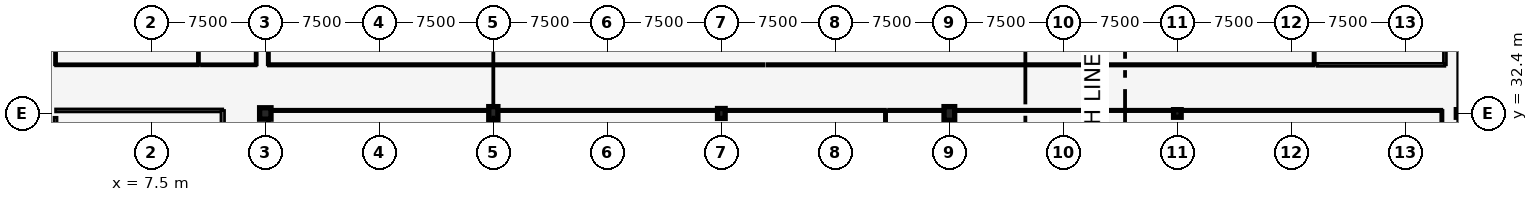
"""IFC4 building model, lengths in metres.
Left out: names, types, materials, properties, quantities, classifications, styles, units other than length and angle.
Written with IfcOpenShell. Run it as: python <this file> out.ifc"""

import sys

from ifc_helpers import new_model, si_unit, direction, frame, frame_2d, origin, origin_2d, place, context, subcontext, project, spatial, rectangle, circle, extrude, element, fill, save


model = new_model("IFC4")
c1 = context("Model", 3, precision=1e-05, world=origin(), true_north=direction((0.0, 1.0)))
c2 = subcontext(c1, "Body", "Model", "MODEL_VIEW")
j1 = project(units=[si_unit("LENGTHUNIT", "METRE"), si_unit("PLANEANGLEUNIT", "RADIAN")], contexts=[c1])
p1 = place(None, origin())
s1 = spatial("IfcSite", under=j1, at=p1, CompositionType="ELEMENT")
p2 = place(p1, origin())
s2 = spatial("IfcBuilding", under=s1, at=p2, CompositionType="ELEMENT")
p3 = place(p2, origin())
s3 = spatial("IfcBuildingStorey", under=s2, at=p3, CompositionType="ELEMENT", Elevation=0.0)
p4 = place(p3, frame((15.0, 32.4, 0.0), z_axis=(0.0, 0.0, 1.0), x_axis=(1.0, 0.0, 0.0)))
e1 = element("IfcColumn", 1, at=p4, inside=s3, PredefinedType="COLUMN", context=c2, shape_type="SweptSolid", body=[
    extrude(rectangle(XDim=0.75, YDim=0.75, at=origin_2d()), origin(), (0.0, 0.0, 1.0), 4.8),
])
p5 = place(p3, frame((30.0, 32.4, 0.0), z_axis=(0.0, 0.0, 1.0), x_axis=(1.0, 0.0, 0.0)))
e2 = element("IfcColumn", 2, at=p5, inside=s3, PredefinedType="COLUMN", context=c2, shape_type="SweptSolid", body=[
    extrude(rectangle(XDim=0.6, YDim=0.9, at=origin_2d()), origin(), (0.0, 0.0, 1.0), 4.8),
])
p6 = place(p3, frame((45.0, 32.4, 0.0), z_axis=(0.0, 0.0, 1.0), x_axis=(1.0, 0.0, 0.0)))
e3 = element("IfcColumn", 3, at=p6, inside=s3, PredefinedType="COLUMN", context=c2, shape_type="SweptSolid", body=[
    extrude(rectangle(XDim=0.5, YDim=0.65, at=origin_2d()), origin(), (0.0, 0.0, 1.0), 4.8),
])
p7 = place(p3, frame((60.0, 32.4, 0.0), z_axis=(0.0, 0.0, 1.0), x_axis=(1.0, 0.0, 0.0)))
e4 = element("IfcColumn", 4, at=p7, inside=s3, PredefinedType="COLUMN", context=c2, shape_type="SweptSolid", body=[
    extrude(rectangle(XDim=0.7, YDim=0.9, at=origin_2d()), origin(), (0.0, 0.0, 1.0), 4.8),
])
p8 = place(p3, frame((75.0, 32.4, 0.0), z_axis=(0.0, 0.0, 1.0), x_axis=(1.0, 0.0, 0.0)))
e5 = element("IfcColumn", 5, at=p8, inside=s3, PredefinedType="COLUMN", context=c2, shape_type="SweptSolid", body=[
    extrude(circle(Radius=0.25, at=origin_2d()), origin(), (0.0, 0.0, 1.0), 4.8),
])
p9 = place(p3, frame((93.6, 32.4, 0.0), z_axis=(0.0, 0.0, 1.0), x_axis=(1.0, 0.0, 0.0)))
e6 = element("IfcColumn", 6, at=p9, inside=s3, PredefinedType="COLUMN", context=c2, shape_type="SweptSolid", body=[
    extrude(rectangle(XDim=0.5, YDim=0.5, at=origin_2d()), origin(), (0.0, 0.0, 1.0), 4.8),
])
p10 = place(p3, frame((93.6, 10.8, 0.0), z_axis=(0.0, 0.0, 1.0), x_axis=(0.0, 1.0, 0.0)))
e7 = element("IfcWall", 7, at=p10, inside=s3, PredefinedType="SOLIDWALL", context=c2, shape_type="SweptSolid", body=[
    extrude(rectangle(XDim=43.2, YDim=0.32, at=frame_2d((21.6, 0.0))), origin(), (0.0, 0.0, 1.0), 4.25),
])
p11 = place(p10, frame((6.5, 0.0, 0.0)))
e8 = element("IfcOpeningElement", 8, at=p11, cuts=e7, PredefinedType="OPENING", context=c2, shape_type="SweptSolid", body=[
    extrude(rectangle(XDim=4.4, YDim=3.55, at=frame_2d((2.2, 1.775))), frame((0.0, 0.17, 0.0), z_axis=(0.0, -1.0, 0.0), x_axis=(1.0, 0.0, 0.0)), (0.0, 0.0, 1.0), 0.34),
])
p12 = place(p10, frame((25.5, 0.0, 0.0)))
e9 = element("IfcOpeningElement", 9, at=p12, cuts=e7, PredefinedType="OPENING", context=c2, shape_type="SweptSolid", body=[
    extrude(rectangle(XDim=4.4, YDim=3.55, at=frame_2d((2.2, 1.775))), frame((0.0, 0.17, 0.0), z_axis=(0.0, -1.0, 0.0), x_axis=(1.0, 0.0, 0.0)), (0.0, 0.0, 1.0), 0.34),
])
p13 = place(p3, frame((55.8, 20.05, 0.0), z_axis=(0.0, 0.0, 1.0), x_axis=(0.0, 1.0, 0.0)))
e10 = element("IfcWall", 10, at=p13, inside=s3, PredefinedType="PARTITIONING", context=c2, shape_type="SweptSolid", body=[
    extrude(rectangle(XDim=12.55, YDim=0.15, at=frame_2d((6.275, 0.0))), origin(), (0.0, 0.0, 1.0), 3.87),
])
p14 = place(p3, frame((15.2, 32.6, 0.0), z_axis=(0.0, 0.0, 1.0), x_axis=(0.0, -1.0, 0.0)))
e11 = element("IfcWall", 11, at=p14, inside=s3, PredefinedType="PARTITIONING", context=c2, shape_type="SweptSolid", body=[
    extrude(rectangle(XDim=12.55, YDim=0.15, at=frame_2d((6.275, 0.0))), origin(), (0.0, 0.0, 1.0), 4.1),
])
p15 = place(p3, frame((15.2, 32.6, 0.0), z_axis=(0.0, 0.0, 1.0), x_axis=(1.0, 0.0, 0.0)))
e12 = element("IfcWall", 12, at=p15, inside=s3, PredefinedType="PARTITIONING", context=c2, shape_type="SweptSolid", body=[
    extrude(rectangle(XDim=40.6, YDim=0.16, at=frame_2d((20.3, 0.0))), origin(), (0.0, 0.0, 1.0), 3.87),
])
p16 = place(p15, frame((19.3, 0.0, 0.0)))
e13 = element("IfcOpeningElement", 13, at=p16, cuts=e12, PredefinedType="OPENING", context=c2, shape_type="SweptSolid", body=[
    extrude(rectangle(XDim=2.0, YDim=2.3, at=frame_2d((1.0, 1.15))), frame((0.0, 0.09, 0.0), z_axis=(0.0, -1.0, 0.0), x_axis=(1.0, 0.0, 0.0)), (0.0, 0.0, 1.0), 0.18),
])
p17 = place(p15, frame((35.4, 0.0, 0.0)))
e14 = element("IfcOpeningElement", 14, at=p17, cuts=e12, PredefinedType="OPENING", context=c2, shape_type="SweptSolid", body=[
    extrude(rectangle(XDim=2.0, YDim=2.3, at=frame_2d((1.0, 1.15))), frame((0.0, 0.09, 0.0), z_axis=(0.0, -1.0, 0.0), x_axis=(1.0, 0.0, 0.0)), (0.0, 0.0, 1.0), 0.18),
])
p18 = place(p3, frame((92.4, 20.05, 0.0), z_axis=(0.0, 0.0, 1.0), x_axis=(0.0, 1.0, 0.0)))
e15 = element("IfcWall", 15, at=p18, inside=s3, PredefinedType="PARTITIONING", context=c2, shape_type="SweptSolid", body=[
    extrude(rectangle(XDim=12.55, YDim=0.15, at=frame_2d((6.275, 0.0))), origin(), (0.0, 0.0, 1.0), 3.782),
])
p19 = place(p3, frame((56.0, 32.6, 0.0), z_axis=(0.0, 0.0, 1.0), x_axis=(1.0, 0.0, 0.0)))
e16 = element("IfcWall", 16, at=p19, inside=s3, PredefinedType="PARTITIONING", context=c2, shape_type="SweptSolid", body=[
    extrude(rectangle(XDim=36.4, YDim=0.16, at=frame_2d((18.2, 0.0))), origin(), (0.0, 0.0, 1.0), 3.782),
])
p20 = place(p19, frame((10.32, 0.0, 0.0)))
e17 = element("IfcOpeningElement", 17, at=p20, cuts=e16, PredefinedType="OPENING", context=c2, shape_type="SweptSolid", body=[
    extrude(rectangle(XDim=2.0, YDim=2.3, at=frame_2d((1.0, 1.15))), frame((0.0, 0.09, 0.0), z_axis=(0.0, -1.0, 0.0), x_axis=(1.0, 0.0, 0.0)), (0.0, 0.0, 1.0), 0.18),
])
p21 = place(p19, frame((31.2, 0.0, 0.0)))
e18 = element("IfcOpeningElement", 18, at=p21, cuts=e16, PredefinedType="OPENING", context=c2, shape_type="SweptSolid", body=[
    extrude(rectangle(XDim=2.0, YDim=2.3, at=frame_2d((1.0, 1.15))), frame((0.0, 0.09, 0.0), z_axis=(0.0, -1.0, 0.0), x_axis=(1.0, 0.0, 0.0)), (0.0, 0.0, 1.0), 0.18),
])
p22 = place(p3, frame((84.0, 35.6, 0.0), z_axis=(0.0, 0.0, 1.0), x_axis=(0.0, 1.0, 0.0)))
e19 = element("IfcWall", 19, at=p22, inside=s3, PredefinedType="PARTITIONING", context=c2, shape_type="SweptSolid", body=[
    extrude(rectangle(XDim=17.15, YDim=0.15, at=frame_2d((8.575, 0.0))), origin(), (0.0, 0.0, 1.0), 4.1),
])
p23 = place(p3, frame((84.0, 35.6, 0.0), z_axis=(0.0, 0.0, 1.0), x_axis=(-1.0, 0.0, 0.0)))
e20 = element("IfcWall", 20, at=p23, inside=s3, PredefinedType="PARTITIONING", context=c2, shape_type="SweptSolid", body=[
    extrude(rectangle(XDim=36.0, YDim=0.16, at=frame_2d((18.0, 0.0))), origin(), (0.0, 0.0, 1.0), 4.025),
])
p24 = place(p23, frame((17.0, 0.0, 0.0)))
e21 = element("IfcOpeningElement", 21, at=p24, cuts=e20, PredefinedType="OPENING", context=c2, shape_type="SweptSolid", body=[
    extrude(rectangle(XDim=2.0, YDim=2.3, at=frame_2d((1.0, 1.15))), frame((0.0, 0.09, 0.0), z_axis=(0.0, -1.0, 0.0), x_axis=(1.0, 0.0, 0.0)), (0.0, 0.0, 1.0), 0.18),
])
p25 = place(p23, frame((30.8, 0.0, 0.0)))
e22 = element("IfcOpeningElement", 22, at=p25, cuts=e20, PredefinedType="OPENING", context=c2, shape_type="SweptSolid", body=[
    extrude(rectangle(XDim=2.0, YDim=2.3, at=frame_2d((1.0, 1.15))), frame((0.0, 0.09, 0.0), z_axis=(0.0, -1.0, 0.0), x_axis=(1.0, 0.0, 0.0)), (0.0, 0.0, 1.0), 0.18),
])
p26 = place(p3, frame((15.2, 52.75, 0.0), z_axis=(0.0, 0.0, 1.0), x_axis=(0.0, -1.0, 0.0)))
e23 = element("IfcWall", 23, at=p26, inside=s3, PredefinedType="PARTITIONING", context=c2, shape_type="SweptSolid", body=[
    extrude(rectangle(XDim=17.15, YDim=0.15, at=frame_2d((8.575, 0.0))), origin(), (0.0, 0.0, 1.0), 4.025),
])
p27 = place(p3, frame((47.8, 35.6, 0.0), z_axis=(0.0, 0.0, 1.0), x_axis=(-1.0, 0.0, 0.0)))
e24 = element("IfcWall", 24, at=p27, inside=s3, PredefinedType="PARTITIONING", context=c2, shape_type="SweptSolid", body=[
    extrude(rectangle(XDim=32.6, YDim=0.16, at=frame_2d((16.3, 0.0))), origin(), (0.0, 0.0, 1.0), 4.025),
])
p28 = place(p27, frame((15.3, 0.0, 0.0)))
e25 = element("IfcOpeningElement", 25, at=p28, cuts=e24, PredefinedType="OPENING", context=c2, shape_type="SweptSolid", body=[
    extrude(rectangle(XDim=2.0, YDim=2.3, at=frame_2d((1.0, 1.15))), frame((0.0, 0.09, 0.0), z_axis=(0.0, -1.0, 0.0), x_axis=(1.0, 0.0, 0.0)), (0.0, 0.0, 1.0), 0.18),
])
p29 = place(p27, frame((27.4, 0.0, 0.0)))
e26 = element("IfcOpeningElement", 26, at=p29, cuts=e24, PredefinedType="OPENING", context=c2, shape_type="SweptSolid", body=[
    extrude(rectangle(XDim=2.0, YDim=2.3, at=frame_2d((1.0, 1.15))), frame((0.0, 0.09, 0.0), z_axis=(0.0, -1.0, 0.0), x_axis=(1.0, 0.0, 0.0)), (0.0, 0.0, 1.0), 0.18),
])
p30 = place(p3, frame((1.2, 32.6, 0.0), z_axis=(0.0, 0.0, 1.0), x_axis=(1.0, 0.0, 0.0)))
e27 = element("IfcWall", 27, at=p30, inside=s3, PredefinedType="SOLIDWALL", context=c2, shape_type="SweptSolid", body=[
    extrude(rectangle(XDim=11.0, YDim=0.2, at=frame_2d((5.5, 0.0))), origin(), (0.0, 0.0, 1.0), 3.87),
])
p31 = place(p3, frame((1.2, 32.15, 0.0), z_axis=(0.0, 0.0, 1.0), x_axis=(0.0, -1.0, 0.0)))
e28 = element("IfcWall", 28, at=p31, inside=s3, PredefinedType="SOLIDWALL", context=c2, shape_type="SweptSolid", body=[
    extrude(rectangle(XDim=9.7, YDim=0.2, at=frame_2d((4.85, 0.0))), origin(), (0.0, 0.0, 1.0), 4.1),
])
p32 = place(p3, frame((12.2, 22.2, 0.0), z_axis=(0.0, 0.0, 1.0), x_axis=(0.0, 1.0, 0.0)))
e29 = element("IfcWall", 29, at=p32, inside=s3, PredefinedType="SOLIDWALL", context=c2, shape_type="SweptSolid", body=[
    extrude(rectangle(XDim=10.4, YDim=0.24, at=frame_2d((5.2, 0.0))), origin(), (0.0, 0.0, 1.0), 3.87),
])
p33 = place(p32, frame((4.4, 0.0, 0.0)))
e30 = element("IfcOpeningElement", 30, at=p33, cuts=e29, PredefinedType="OPENING", context=c2, shape_type="SweptSolid", body=[
    extrude(rectangle(XDim=1.6, YDim=2.15, at=frame_2d((0.8, 1.075))), frame((0.0, 0.13, 0.0), z_axis=(0.0, -1.0, 0.0), x_axis=(1.0, 0.0, 0.0)), (0.0, 0.0, 1.0), 0.26),
])
p34 = place(p3, frame((92.6, 35.6, 0.0), z_axis=(0.0, 0.0, 1.0), x_axis=(0.0, 1.0, 0.0)))
e31 = element("IfcWall", 31, at=p34, inside=s3, PredefinedType="SOLIDWALL", context=c2, shape_type="SweptSolid", body=[
    extrude(rectangle(XDim=9.55, YDim=0.2, at=frame_2d((4.775, 0.0))), origin(), (0.0, 0.0, 1.0), 4.1),
])
p35 = place(p3, frame((92.6, 35.6, 0.0), z_axis=(0.0, 0.0, 1.0), x_axis=(-1.0, 0.0, 0.0)))
e32 = element("IfcWall", 32, at=p35, inside=s3, PredefinedType="SOLIDWALL", context=c2, shape_type="SweptSolid", body=[
    extrude(rectangle(XDim=8.4, YDim=0.2, at=frame_2d((4.2, 0.0))), origin(), (0.0, 0.0, 1.0), 4.1),
])
p36 = place(p35, frame((3.3, 0.0, 0.0)))
e33 = element("IfcOpeningElement", 33, at=p36, cuts=e32, PredefinedType="OPENING", context=c2, shape_type="SweptSolid", body=[
    extrude(rectangle(XDim=1.8, YDim=2.2, at=frame_2d((0.9, 1.1))), frame((0.0, 0.11, 0.0), z_axis=(0.0, -1.0, 0.0), x_axis=(1.0, 0.0, 0.0)), (0.0, 0.0, 1.0), 0.22),
])
for number, where, z_axis, x_axis in (
    (34, (10.6, 35.6, 0.0), (0.0, 0.0, 1.0), (0.0, 1.0, 0.0)),
    (35, (1.2, 42.95, 0.0), (0.0, 0.0, 1.0), (0.0, -1.0, 0.0)),
):
    element("IfcWall", number, at=place(p3, frame(where, z_axis=z_axis, x_axis=x_axis)), inside=s3, PredefinedType="PARTITIONING", context=c2, shape_type="SweptSolid", body=[
        extrude(rectangle(XDim=7.35, YDim=0.14, at=frame_2d((3.675, 0.0))), origin(), (0.0, 0.0, 1.0), 3.8),
    ])
p37 = place(p3, frame((10.6, 35.6, 0.0), z_axis=(0.0, 0.0, 1.0), x_axis=(-1.0, 0.0, 0.0)))
e36 = element("IfcWall", 36, at=p37, inside=s3, PredefinedType="PARTITIONING", context=c2, shape_type="SweptSolid", body=[
    extrude(rectangle(XDim=9.4, YDim=0.14, at=frame_2d((4.7, 0.0))), origin(), (0.0, 0.0, 1.0), 3.8),
])
p38 = place(p37, frame((4.21, 0.0, 0.0)))
e37 = element("IfcOpeningElement", 37, at=p38, cuts=e36, PredefinedType="OPENING", context=c2, shape_type="SweptSolid", body=[
    extrude(rectangle(XDim=0.98, YDim=2.15, at=frame_2d((0.49, 1.075))), frame((0.0, 0.08, 0.0), z_axis=(0.0, -1.0, 0.0), x_axis=(1.0, 0.0, 0.0)), (0.0, 0.0, 1.0), 0.16),
])
p39 = place(p3, frame((14.4, 35.6, 0.0), z_axis=(0.0, 0.0, 1.0), x_axis=(0.0, 1.0, 0.0)))
e38 = element("IfcWall", 38, at=p39, inside=s3, PredefinedType="PARTITIONING", context=c2, shape_type="SweptSolid", body=[
    extrude(rectangle(XDim=7.15, YDim=0.14, at=frame_2d((3.575, 0.0))), origin(), (0.0, 0.0, 1.0), 3.8),
])
p40 = place(p3, frame((14.4, 35.6, 0.0), z_axis=(0.0, 0.0, 1.0), x_axis=(-1.0, 0.0, 0.0)))
e39 = element("IfcWall", 39, at=p40, inside=s3, PredefinedType="PARTITIONING", context=c2, shape_type="SweptSolid", body=[
    extrude(rectangle(XDim=3.6, YDim=0.14, at=frame_2d((1.8, 0.0))), origin(), (0.0, 0.0, 1.0), 3.8),
])
p41 = place(p40, frame((1.305, 0.0, 0.0)))
e40 = element("IfcOpeningElement", 40, at=p41, cuts=e39, PredefinedType="OPENING", context=c2, shape_type="SweptSolid", body=[
    extrude(rectangle(XDim=0.99, YDim=2.15, at=frame_2d((0.495, 1.075))), frame((0.0, 0.08, 0.0), z_axis=(0.0, -1.0, 0.0), x_axis=(1.0, 0.0, 0.0)), (0.0, 0.0, 1.0), 0.16),
])
p42 = place(p16, origin())
e41 = element("IfcDoor", 41, at=p42, inside=s3, OperationType="DOUBLE_SWING_LEFT", PredefinedType="DOOR", context=c2, shape_type="SweptSolid", body=[
    extrude(rectangle(XDim=2.0, YDim=2.3, at=frame_2d((1.0, 1.15))), frame((0.0, 0.025, 0.0), z_axis=(0.0, -1.0, 0.0), x_axis=(1.0, 0.0, 0.0)), (0.0, 0.0, 1.0), 0.05),
])
fill(e13, e41)
p43 = place(p17, origin())
e42 = element("IfcDoor", 42, at=p43, inside=s3, OperationType="DOUBLE_SWING_LEFT", PredefinedType="DOOR", context=c2, shape_type="SweptSolid", body=[
    extrude(rectangle(XDim=2.0, YDim=2.3, at=frame_2d((1.0, 1.15))), frame((0.0, 0.025, 0.0), z_axis=(0.0, -1.0, 0.0), x_axis=(1.0, 0.0, 0.0)), (0.0, 0.0, 1.0), 0.05),
])
fill(e14, e42)
p44 = place(p20, origin())
e43 = element("IfcDoor", 43, at=p44, inside=s3, OperationType="DOUBLE_SWING_LEFT", PredefinedType="DOOR", context=c2, shape_type="SweptSolid", body=[
    extrude(rectangle(XDim=2.0, YDim=2.3, at=frame_2d((1.0, 1.15))), frame((0.0, 0.025, 0.0), z_axis=(0.0, -1.0, 0.0), x_axis=(1.0, 0.0, 0.0)), (0.0, 0.0, 1.0), 0.05),
])
fill(e17, e43)
p45 = place(p21, origin())
e44 = element("IfcDoor", 44, at=p45, inside=s3, OperationType="DOUBLE_SWING_LEFT", PredefinedType="DOOR", context=c2, shape_type="SweptSolid", body=[
    extrude(rectangle(XDim=2.0, YDim=2.3, at=frame_2d((1.0, 1.15))), frame((0.0, 0.025, 0.0), z_axis=(0.0, -1.0, 0.0), x_axis=(1.0, 0.0, 0.0)), (0.0, 0.0, 1.0), 0.05),
])
fill(e18, e44)
p46 = place(p24, origin())
e45 = element("IfcDoor", 45, at=p46, inside=s3, OperationType="DOUBLE_SWING_LEFT", PredefinedType="DOOR", context=c2, shape_type="SweptSolid", body=[
    extrude(rectangle(XDim=2.0, YDim=2.3, at=frame_2d((1.0, 1.15))), frame((0.0, 0.025, 0.0), z_axis=(0.0, -1.0, 0.0), x_axis=(1.0, 0.0, 0.0)), (0.0, 0.0, 1.0), 0.05),
])
fill(e21, e45)
p47 = place(p25, origin())
e46 = element("IfcDoor", 46, at=p47, inside=s3, OperationType="DOUBLE_SWING_LEFT", PredefinedType="DOOR", context=c2, shape_type="SweptSolid", body=[
    extrude(rectangle(XDim=2.0, YDim=2.3, at=frame_2d((1.0, 1.15))), frame((0.0, 0.025, 0.0), z_axis=(0.0, -1.0, 0.0), x_axis=(1.0, 0.0, 0.0)), (0.0, 0.0, 1.0), 0.05),
])
fill(e22, e46)
p48 = place(p28, origin())
e47 = element("IfcDoor", 47, at=p48, inside=s3, OperationType="DOUBLE_SWING_LEFT", PredefinedType="DOOR", context=c2, shape_type="SweptSolid", body=[
    extrude(rectangle(XDim=2.0, YDim=2.3, at=frame_2d((1.0, 1.15))), frame((0.0, 0.025, 0.0), z_axis=(0.0, -1.0, 0.0), x_axis=(1.0, 0.0, 0.0)), (0.0, 0.0, 1.0), 0.05),
])
fill(e25, e47)
p49 = place(p29, origin())
e48 = element("IfcDoor", 48, at=p49, inside=s3, OperationType="DOUBLE_SWING_LEFT", PredefinedType="DOOR", context=c2, shape_type="SweptSolid", body=[
    extrude(rectangle(XDim=2.0, YDim=2.3, at=frame_2d((1.0, 1.15))), frame((0.0, 0.025, 0.0), z_axis=(0.0, -1.0, 0.0), x_axis=(1.0, 0.0, 0.0)), (0.0, 0.0, 1.0), 0.05),
])
fill(e26, e48)
p50 = place(p36, origin())
e49 = element("IfcDoor", 49, at=p50, inside=s3, OperationType="DOUBLE_SWING_LEFT", PredefinedType="DOOR", context=c2, shape_type="SweptSolid", body=[
    extrude(rectangle(XDim=1.8, YDim=2.2, at=frame_2d((0.9, 1.1))), frame((0.0, 0.025, 0.0), z_axis=(0.0, -1.0, 0.0), x_axis=(1.0, 0.0, 0.0)), (0.0, 0.0, 1.0), 0.05),
])
fill(e33, e49)
p51 = place(p38, origin())
e50 = element("IfcDoor", 50, at=p51, inside=s3, OperationType="SINGLE_SWING_LEFT", PredefinedType="DOOR", context=c2, shape_type="SweptSolid", body=[
    extrude(rectangle(XDim=0.98, YDim=2.15, at=frame_2d((0.49, 1.075))), frame((0.0, 0.025, 0.0), z_axis=(0.0, -1.0, 0.0), x_axis=(1.0, 0.0, 0.0)), (0.0, 0.0, 1.0), 0.05),
])
fill(e37, e50)
p52 = place(p41, origin())
e51 = element("IfcDoor", 51, at=p52, inside=s3, OperationType="SINGLE_SWING_RIGHT", PredefinedType="DOOR", context=c2, shape_type="SweptSolid", body=[
    extrude(rectangle(XDim=0.99, YDim=2.15, at=frame_2d((0.495, 1.075))), frame((0.0, 0.025, 0.0), z_axis=(0.0, -1.0, 0.0), x_axis=(1.0, 0.0, 0.0)), (0.0, 0.0, 1.0), 0.05),
])
fill(e40, e51)
save(model, sys.argv[1])
